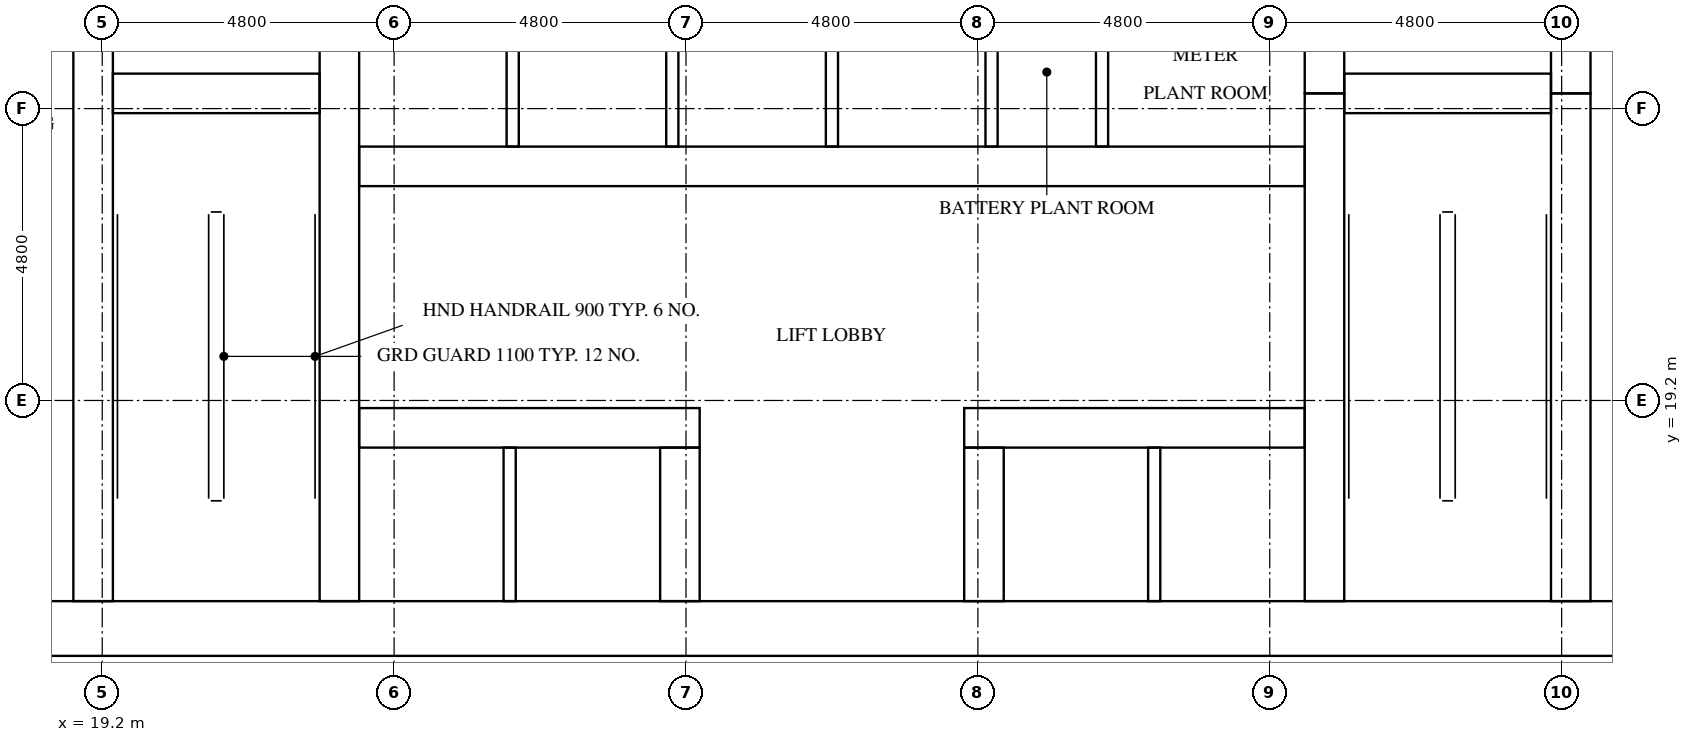
"""IFC4 building model, lengths in metres.
Left out: names, types, materials, properties, quantities, classifications, styles, units other than length and angle.
Written with IfcOpenShell. Run it as: python <this file> out.ifc"""

import sys

from ifc_helpers import new_model, si_unit, direction, frame, frame_2d, origin, place, context, subcontext, project, spatial, rectangle, extrude, element, fill, save


model = new_model("IFC4")
c1 = context("Model", 3, precision=1e-05, world=origin(), true_north=direction((0.0, 1.0)))
c2 = subcontext(c1, "Body", "Model", "MODEL_VIEW")
j1 = project(units=[si_unit("LENGTHUNIT", "METRE"), si_unit("PLANEANGLEUNIT", "RADIAN")], contexts=[c1])
p1 = place(None, origin())
s1 = spatial("IfcSite", under=j1, at=p1, CompositionType="ELEMENT")
p2 = place(p1, origin())
s2 = spatial("IfcBuilding", under=s1, at=p2, CompositionType="ELEMENT")
p3 = place(p2, frame((0.0, 0.0, 53.9)))
s3 = spatial("IfcBuildingStorey", under=s2, at=p3, CompositionType="ELEMENT", Elevation=53.9)
p4 = place(p3, frame((15.0, 15.45, 0.0), z_axis=(0.0, 0.0, 1.0), x_axis=(1.0, 0.0, 0.0)))
e1 = element("IfcWall", 1, at=p4, inside=s3, PredefinedType="SHEAR", context=c2, shape_type="SweptSolid", body=[
    extrude(rectangle(XDim=32.4, YDim=0.9, at=frame_2d((16.2, 0.0))), origin(), (0.0, 0.0, 1.0), 5.1),
])
p5 = place(p4, frame((15.3, 0.0, 0.0)))
e2 = element("IfcOpeningElement", 2, at=p5, cuts=e1, PredefinedType="OPENING", context=c2, shape_type="SweptSolid", body=[
    extrude(rectangle(XDim=1.8, YDim=2.1, at=frame_2d((0.9, 1.05))), frame((0.0, 0.46, 0.0), z_axis=(0.0, -1.0, 0.0), x_axis=(1.0, 0.0, 0.0)), (0.0, 0.0, 1.0), 0.92),
])
p6 = place(p3, frame((19.05, 15.9, 0.0), z_axis=(0.0, 0.0, 1.0), x_axis=(0.0, 1.0, 0.0)))
e3 = element("IfcWall", 3, at=p6, inside=s3, PredefinedType="SHEAR", context=c2, shape_type="SweptSolid", body=[
    extrude(rectangle(XDim=15.025, YDim=0.65, at=frame_2d((7.513, 0.0))), origin(), (0.0, 0.0, 1.0), 5.1),
])
p7 = place(p6, frame((9.55, 0.0, 0.0)))
e4 = element("IfcOpeningElement", 4, at=p7, cuts=e3, PredefinedType="OPENING", context=c2, shape_type="SweptSolid", body=[
    extrude(rectangle(XDim=1.1, YDim=2.1, at=frame_2d((0.55, 1.05))), frame((0.0, 0.335, 0.0), z_axis=(0.0, -1.0, 0.0), x_axis=(1.0, 0.0, 0.0)), (0.0, 0.0, 1.0), 0.67),
])
p8 = place(p6, frame((13.05, 0.0, 0.0)))
e5 = element("IfcOpeningElement", 5, at=p8, cuts=e3, PredefinedType="OPENING", context=c2, shape_type="SweptSolid", body=[
    extrude(rectangle(XDim=1.1, YDim=2.1, at=frame_2d((0.55, 1.05))), frame((0.0, 0.335, 0.0), z_axis=(0.0, -1.0, 0.0), x_axis=(1.0, 0.0, 0.0)), (0.0, 0.0, 1.0), 0.67),
])
p9 = place(p6, frame((0.3, 0.0, 0.0)))
e6 = element("IfcOpeningElement", 6, at=p9, cuts=e3, PredefinedType="OPENING", context=c2, shape_type="SweptSolid", body=[
    extrude(rectangle(XDim=1.2, YDim=2.1, at=frame_2d((0.6, 1.05))), frame((0.0, 0.335, 0.0), z_axis=(0.0, -1.0, 0.0), x_axis=(1.0, 0.0, 0.0)), (0.0, 0.0, 1.0), 0.67),
])
p10 = place(p3, frame((23.1, 15.9, 0.0), z_axis=(0.0, 0.0, 1.0), x_axis=(0.0, 1.0, 0.0)))
e7 = element("IfcWall", 7, at=p10, inside=s3, PredefinedType="SHEAR", context=c2, shape_type="SweptSolid", body=[
    extrude(rectangle(XDim=21.0, YDim=0.65, at=frame_2d((10.5, 0.0))), origin(), (0.0, 0.0, 1.0), 5.1),
])
p11 = place(p3, frame((39.3, 15.9, 0.0), z_axis=(0.0, 0.0, 1.0), x_axis=(0.0, 1.0, 0.0)))
e8 = element("IfcWall", 8, at=p11, inside=s3, PredefinedType="SHEAR", context=c2, shape_type="SweptSolid", body=[
    extrude(rectangle(XDim=8.35, YDim=0.65, at=frame_2d((4.175, 0.0))), origin(), (0.0, 0.0, 1.0), 5.1),
])
p12 = place(p3, frame((39.3, 24.25, 0.0), z_axis=(0.0, 0.0, 1.0), x_axis=(0.0, 1.0, 0.0)))
e9 = element("IfcWall", 9, at=p12, inside=s3, PredefinedType="SHEAR", context=c2, shape_type="SweptSolid", body=[
    extrude(rectangle(XDim=3.5, YDim=0.65, at=frame_2d((1.75, 0.0))), origin(), (0.0, 0.0, 1.0), 5.1),
])
p13 = place(p3, frame((43.35, 15.9, 0.0), z_axis=(0.0, 0.0, 1.0), x_axis=(0.0, 1.0, 0.0)))
e10 = element("IfcWall", 10, at=p13, inside=s3, PredefinedType="SHEAR", context=c2, shape_type="SweptSolid", body=[
    extrude(rectangle(XDim=8.35, YDim=0.65, at=frame_2d((4.175, 0.0))), origin(), (0.0, 0.0, 1.0), 5.1),
])
p14 = place(p13, frame((0.3, 0.0, 0.0)))
e11 = element("IfcOpeningElement", 11, at=p14, cuts=e10, PredefinedType="OPENING", context=c2, shape_type="SweptSolid", body=[
    extrude(rectangle(XDim=1.2, YDim=2.1, at=frame_2d((0.6, 1.05))), frame((0.0, 0.335, 0.0), z_axis=(0.0, -1.0, 0.0), x_axis=(1.0, 0.0, 0.0)), (0.0, 0.0, 1.0), 0.67),
])
p15 = place(p3, frame((43.35, 24.25, 0.0), z_axis=(0.0, 0.0, 1.0), x_axis=(0.0, 1.0, 0.0)))
e12 = element("IfcWall", 12, at=p15, inside=s3, PredefinedType="SHEAR", context=c2, shape_type="SweptSolid", body=[
    extrude(rectangle(XDim=3.5, YDim=0.65, at=frame_2d((1.75, 0.0))), origin(), (0.0, 0.0, 1.0), 5.1),
])
p16 = place(p15, frame((1.2, 0.0, 0.0)))
e13 = element("IfcOpeningElement", 13, at=p16, cuts=e12, PredefinedType="OPENING", context=c2, shape_type="SweptSolid", body=[
    extrude(rectangle(XDim=1.1, YDim=2.1, at=frame_2d((0.55, 1.05))), frame((0.0, 0.335, 0.0), z_axis=(0.0, -1.0, 0.0), x_axis=(1.0, 0.0, 0.0)), (0.0, 0.0, 1.0), 0.67),
])
for number, where, z_axis, x_axis in (
    (14, (19.375, 24.25, 0.0), (0.0, 0.0, 1.0), (1.0, 0.0, 0.0)),
    (15, (39.625, 24.25, 0.0), (0.0, 0.0, 1.0), (1.0, 0.0, 0.0)),
):
    element("IfcWall", number, at=place(p3, frame(where, z_axis=z_axis, x_axis=x_axis)), inside=s3, PredefinedType="SHEAR", context=c2, shape_type="SweptSolid", body=[
        extrude(rectangle(XDim=3.4, YDim=0.65, at=frame_2d((1.7, 0.0))), origin(), (0.0, 0.0, 1.0), 5.1),
    ])
p17 = place(p3, frame((23.425, 18.75, 0.0), z_axis=(0.0, 0.0, 1.0), x_axis=(1.0, 0.0, 0.0)))
e16 = element("IfcWall", 16, at=p17, inside=s3, PredefinedType="SHEAR", context=c2, shape_type="SweptSolid", body=[
    extrude(rectangle(XDim=5.6, YDim=0.65, at=frame_2d((2.8, 0.0))), origin(), (0.0, 0.0, 1.0), 5.1),
])
p18 = place(p17, frame((0.637, 0.0, 0.0)))
e17 = element("IfcOpeningElement", 17, at=p18, cuts=e16, PredefinedType="OPENING", context=c2, shape_type="SweptSolid", body=[
    extrude(rectangle(XDim=1.1, YDim=2.1, at=frame_2d((0.55, 1.05))), frame((0.0, 0.335, 0.0), z_axis=(0.0, -1.0, 0.0), x_axis=(1.0, 0.0, 0.0)), (0.0, 0.0, 1.0), 0.67),
])
p19 = place(p17, frame((3.212, 0.0, 0.0)))
e18 = element("IfcOpeningElement", 18, at=p19, cuts=e16, PredefinedType="OPENING", context=c2, shape_type="SweptSolid", body=[
    extrude(rectangle(XDim=1.1, YDim=2.1, at=frame_2d((0.55, 1.05))), frame((0.0, 0.335, 0.0), z_axis=(0.0, -1.0, 0.0), x_axis=(1.0, 0.0, 0.0)), (0.0, 0.0, 1.0), 0.67),
])
p20 = place(p3, frame((33.375, 18.75, 0.0), z_axis=(0.0, 0.0, 1.0), x_axis=(1.0, 0.0, 0.0)))
e19 = element("IfcWall", 19, at=p20, inside=s3, PredefinedType="SHEAR", context=c2, shape_type="SweptSolid", body=[
    extrude(rectangle(XDim=5.6, YDim=0.65, at=frame_2d((2.8, 0.0))), origin(), (0.0, 0.0, 1.0), 5.1),
])
p21 = place(p20, frame((1.288, 0.0, 0.0)))
e20 = element("IfcOpeningElement", 20, at=p21, cuts=e19, PredefinedType="OPENING", context=c2, shape_type="SweptSolid", body=[
    extrude(rectangle(XDim=1.1, YDim=2.1, at=frame_2d((0.55, 1.05))), frame((0.0, 0.335, 0.0), z_axis=(0.0, -1.0, 0.0), x_axis=(1.0, 0.0, 0.0)), (0.0, 0.0, 1.0), 0.67),
])
p22 = place(p20, frame((3.863, 0.0, 0.0)))
e21 = element("IfcOpeningElement", 21, at=p22, cuts=e19, PredefinedType="OPENING", context=c2, shape_type="SweptSolid", body=[
    extrude(rectangle(XDim=1.1, YDim=2.1, at=frame_2d((0.55, 1.05))), frame((0.0, 0.335, 0.0), z_axis=(0.0, -1.0, 0.0), x_axis=(1.0, 0.0, 0.0)), (0.0, 0.0, 1.0), 0.67),
])
p23 = place(p3, frame((23.425, 23.05, 0.0), z_axis=(0.0, 0.0, 1.0), x_axis=(1.0, 0.0, 0.0)))
e22 = element("IfcWall", 22, at=p23, inside=s3, PredefinedType="SHEAR", context=c2, shape_type="SweptSolid", body=[
    extrude(rectangle(XDim=15.55, YDim=0.65, at=frame_2d((7.775, 0.0))), origin(), (0.0, 0.0, 1.0), 5.1),
])
p24 = place(p23, frame((0.663, 0.0, 0.0)))
e23 = element("IfcOpeningElement", 23, at=p24, cuts=e22, PredefinedType="OPENING", context=c2, shape_type="SweptSolid", body=[
    extrude(rectangle(XDim=1.1, YDim=2.1, at=frame_2d((0.55, 1.05))), frame((0.0, 0.335, 0.0), z_axis=(0.0, -1.0, 0.0), x_axis=(1.0, 0.0, 0.0)), (0.0, 0.0, 1.0), 0.67),
])
p25 = place(p23, frame((3.288, 0.0, 0.0)))
e24 = element("IfcOpeningElement", 24, at=p25, cuts=e22, PredefinedType="OPENING", context=c2, shape_type="SweptSolid", body=[
    extrude(rectangle(XDim=1.1, YDim=2.1, at=frame_2d((0.55, 1.05))), frame((0.0, 0.335, 0.0), z_axis=(0.0, -1.0, 0.0), x_axis=(1.0, 0.0, 0.0)), (0.0, 0.0, 1.0), 0.67),
])
p26 = place(p23, frame((10.809, 0.0, 0.0)))
e25 = element("IfcOpeningElement", 25, at=p26, cuts=e22, PredefinedType="OPENING", context=c2, shape_type="SweptSolid", body=[
    extrude(rectangle(XDim=1.0, YDim=2.1, at=frame_2d((0.5, 1.05))), frame((0.0, 0.335, 0.0), z_axis=(0.0, -1.0, 0.0), x_axis=(1.0, 0.0, 0.0)), (0.0, 0.0, 1.0), 0.67),
])
p27 = place(p23, frame((13.434, 0.0, 0.0)))
e26 = element("IfcOpeningElement", 26, at=p27, cuts=e22, PredefinedType="OPENING", context=c2, shape_type="SweptSolid", body=[
    extrude(rectangle(XDim=1.0, YDim=2.1, at=frame_2d((0.5, 1.05))), frame((0.0, 0.335, 0.0), z_axis=(0.0, -1.0, 0.0), x_axis=(1.0, 0.0, 0.0)), (0.0, 0.0, 1.0), 0.67),
])
for number, where, z_axis, x_axis in (
    (27, (28.7, 15.9, 0.0), (0.0, 0.0, 1.0), (0.0, 1.0, 0.0)),
    (28, (33.7, 15.9, 0.0), (0.0, 0.0, 1.0), (0.0, 1.0, 0.0)),
):
    element("IfcWall", number, at=place(p3, frame(where, z_axis=z_axis, x_axis=x_axis)), inside=s3, PredefinedType="SHEAR", context=c2, shape_type="SweptSolid", body=[
        extrude(rectangle(XDim=2.525, YDim=0.65, at=frame_2d((1.263, 0.0))), origin(), (0.0, 0.0, 1.0), 5.1),
    ])
for number, where, z_axis, x_axis in (
    (29, (25.95, 23.375, 0.0), (0.0, 0.0, 1.0), (0.0, 1.0, 0.0)),
    (30, (28.575, 23.375, 0.0), (0.0, 0.0, 1.0), (0.0, 1.0, 0.0)),
    (31, (31.2, 23.375, 0.0), (0.0, 0.0, 1.0), (0.0, 1.0, 0.0)),
    (32, (33.825, 23.375, 0.0), (0.0, 0.0, 1.0), (0.0, 1.0, 0.0)),
):
    element("IfcWall", number, at=place(p3, frame(where, z_axis=z_axis, x_axis=x_axis)), inside=s3, PredefinedType="SOLIDWALL", context=c2, shape_type="SweptSolid", body=[
        extrude(rectangle(XDim=2.45, YDim=0.2, at=frame_2d((1.225, 0.0))), origin(), (0.0, 0.0, 1.0), 5.1),
    ])
for number, where, z_axis, x_axis in (
    (33, (25.9, 15.9, 0.0), (0.0, 0.0, 1.0), (0.0, 1.0, 0.0)),
    (34, (36.5, 15.9, 0.0), (0.0, 0.0, 1.0), (0.0, 1.0, 0.0)),
):
    element("IfcWall", number, at=place(p3, frame(where, z_axis=z_axis, x_axis=x_axis)), inside=s3, PredefinedType="SOLIDWALL", context=c2, shape_type="SweptSolid", body=[
        extrude(rectangle(XDim=2.525, YDim=0.2, at=frame_2d((1.263, 0.0))), origin(), (0.0, 0.0, 1.0), 5.1),
    ])
p28 = place(p3, frame((35.642, 23.375, 0.0), z_axis=(0.0, 0.0, 1.0), x_axis=(0.0, 1.0, 0.0)))
e35 = element("IfcWall", 35, at=p28, inside=s3, PredefinedType="PARTITIONING", context=c2, shape_type="SweptSolid", body=[
    extrude(rectangle(XDim=2.45, YDim=0.2, at=frame_2d((1.225, 0.0))), origin(), (0.0, 0.0, 1.0), 5.1),
])
p29 = place(p18, origin())
e36 = element("IfcDoor", 36, at=p29, inside=s3, OperationType="DOUBLE_DOOR_SLIDING", PredefinedType="DOOR", context=c2, shape_type="SweptSolid", body=[
    extrude(rectangle(XDim=1.1, YDim=2.1, at=frame_2d((0.55, 1.05))), frame((0.0, 0.025, 0.0), z_axis=(0.0, -1.0, 0.0), x_axis=(1.0, 0.0, 0.0)), (0.0, 0.0, 1.0), 0.05),
])
fill(e17, e36)
p30 = place(p19, origin())
e37 = element("IfcDoor", 37, at=p30, inside=s3, OperationType="DOUBLE_DOOR_SLIDING", PredefinedType="DOOR", context=c2, shape_type="SweptSolid", body=[
    extrude(rectangle(XDim=1.1, YDim=2.1, at=frame_2d((0.55, 1.05))), frame((0.0, 0.025, 0.0), z_axis=(0.0, -1.0, 0.0), x_axis=(1.0, 0.0, 0.0)), (0.0, 0.0, 1.0), 0.05),
])
fill(e18, e37)
p31 = place(p21, origin())
e38 = element("IfcDoor", 38, at=p31, inside=s3, OperationType="DOUBLE_DOOR_SLIDING", PredefinedType="DOOR", context=c2, shape_type="SweptSolid", body=[
    extrude(rectangle(XDim=1.1, YDim=2.1, at=frame_2d((0.55, 1.05))), frame((0.0, 0.025, 0.0), z_axis=(0.0, -1.0, 0.0), x_axis=(1.0, 0.0, 0.0)), (0.0, 0.0, 1.0), 0.05),
])
fill(e20, e38)
p32 = place(p22, origin())
e39 = element("IfcDoor", 39, at=p32, inside=s3, OperationType="DOUBLE_DOOR_SLIDING", PredefinedType="DOOR", context=c2, shape_type="SweptSolid", body=[
    extrude(rectangle(XDim=1.1, YDim=2.1, at=frame_2d((0.55, 1.05))), frame((0.0, 0.025, 0.0), z_axis=(0.0, -1.0, 0.0), x_axis=(1.0, 0.0, 0.0)), (0.0, 0.0, 1.0), 0.05),
])
fill(e21, e39)
p33 = place(p24, origin())
e40 = element("IfcDoor", 40, at=p33, inside=s3, OperationType="DOUBLE_DOOR_SLIDING", PredefinedType="DOOR", context=c2, shape_type="SweptSolid", body=[
    extrude(rectangle(XDim=1.1, YDim=2.1, at=frame_2d((0.55, 1.05))), frame((0.0, 0.025, 0.0), z_axis=(0.0, -1.0, 0.0), x_axis=(1.0, 0.0, 0.0)), (0.0, 0.0, 1.0), 0.05),
])
fill(e23, e40)
p34 = place(p25, origin())
e41 = element("IfcDoor", 41, at=p34, inside=s3, OperationType="DOUBLE_DOOR_SLIDING", PredefinedType="DOOR", context=c2, shape_type="SweptSolid", body=[
    extrude(rectangle(XDim=1.1, YDim=2.1, at=frame_2d((0.55, 1.05))), frame((0.0, 0.025, 0.0), z_axis=(0.0, -1.0, 0.0), x_axis=(1.0, 0.0, 0.0)), (0.0, 0.0, 1.0), 0.05),
])
fill(e24, e41)
p35 = place(p9, frame((1.2, 0.0, 0.0), z_axis=(0.0, 0.0, 1.0), x_axis=(-1.0, 0.0, 0.0)))
e42 = element("IfcDoor", 42, at=p35, inside=s3, OperationType="SINGLE_SWING_LEFT", PredefinedType="DOOR", context=c2, shape_type="SweptSolid", body=[
    extrude(rectangle(XDim=1.2, YDim=2.1, at=frame_2d((0.6, 1.05))), frame((0.0, 0.025, 0.0), z_axis=(0.0, -1.0, 0.0), x_axis=(1.0, 0.0, 0.0)), (0.0, 0.0, 1.0), 0.05),
])
fill(e6, e42)
p36 = place(p14, origin())
e43 = element("IfcDoor", 43, at=p36, inside=s3, OperationType="SINGLE_SWING_RIGHT", PredefinedType="DOOR", context=c2, shape_type="SweptSolid", body=[
    extrude(rectangle(XDim=1.2, YDim=2.1, at=frame_2d((0.6, 1.05))), frame((0.0, 0.025, 0.0), z_axis=(0.0, -1.0, 0.0), x_axis=(1.0, 0.0, 0.0)), (0.0, 0.0, 1.0), 0.05),
])
fill(e11, e43)
p37 = place(p5, frame((1.8, 0.0, 0.0), z_axis=(0.0, 0.0, 1.0), x_axis=(-1.0, 0.0, 0.0)))
e44 = element("IfcDoor", 44, at=p37, inside=s3, OperationType="DOUBLE_DOOR_SINGLE_SWING", PredefinedType="DOOR", context=c2, shape_type="SweptSolid", body=[
    extrude(rectangle(XDim=1.8, YDim=2.1, at=frame_2d((0.9, 1.05))), frame((0.0, 0.025, 0.0), z_axis=(0.0, -1.0, 0.0), x_axis=(1.0, 0.0, 0.0)), (0.0, 0.0, 1.0), 0.05),
])
fill(e2, e44)
p38 = place(p26, frame((1.0, 0.0, 0.0), z_axis=(0.0, 0.0, 1.0), x_axis=(-1.0, 0.0, 0.0)))
e45 = element("IfcDoor", 45, at=p38, inside=s3, OperationType="SINGLE_SWING_RIGHT", PredefinedType="DOOR", context=c2, shape_type="SweptSolid", body=[
    extrude(rectangle(XDim=1.0, YDim=2.1, at=frame_2d((0.5, 1.05))), frame((0.0, 0.025, 0.0), z_axis=(0.0, -1.0, 0.0), x_axis=(1.0, 0.0, 0.0)), (0.0, 0.0, 1.0), 0.05),
])
fill(e25, e45)
p39 = place(p27, frame((1.0, 0.0, 0.0), z_axis=(0.0, 0.0, 1.0), x_axis=(-1.0, 0.0, 0.0)))
e46 = element("IfcDoor", 46, at=p39, inside=s3, OperationType="SINGLE_SWING_LEFT", PredefinedType="DOOR", context=c2, shape_type="SweptSolid", body=[
    extrude(rectangle(XDim=1.0, YDim=2.1, at=frame_2d((0.5, 1.05))), frame((0.0, 0.025, 0.0), z_axis=(0.0, -1.0, 0.0), x_axis=(1.0, 0.0, 0.0)), (0.0, 0.0, 1.0), 0.05),
])
fill(e26, e46)
save(model, sys.argv[1])
